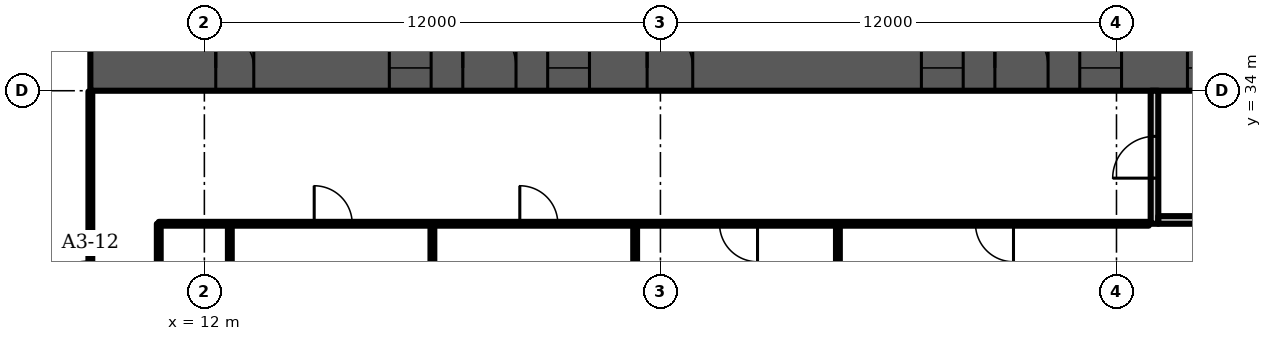
"""IFC4 building model, lengths in metres.
Left out: names, types, materials, properties, quantities, classifications, styles, units other than length and angle.
Written with IfcOpenShell. Run it as: python <this file> out.ifc"""

import sys

from ifc_helpers import new_model, si_unit, direction, frame, frame_2d, origin, place, context, subcontext, project, spatial, rectangle, extrude, element, fill, save


model = new_model("IFC4")
c1 = context("Model", 3, precision=1e-05, world=origin(), true_north=direction((0.0, 1.0)))
c2 = subcontext(c1, "Body", "Model", "MODEL_VIEW")
j1 = project(units=[si_unit("LENGTHUNIT", "METRE"), si_unit("PLANEANGLEUNIT", "RADIAN")], contexts=[c1])
p1 = place(None, origin())
s1 = spatial("IfcSite", under=j1, at=p1, CompositionType="ELEMENT")
p2 = place(p1, origin())
s2 = spatial("IfcBuilding", under=s1, at=p2, CompositionType="ELEMENT")
p3 = place(p2, frame((0.0, 0.0, 70.3)))
s3 = spatial("IfcBuildingStorey", under=s2, at=p3, CompositionType="ELEMENT", Elevation=70.3)
p4 = place(p3, frame((9.0, 34.6, 0.0), z_axis=(0.0, 0.0, 1.0), x_axis=(1.0, 0.0, 0.0)))
e1 = element("IfcWall", 1, at=p4, inside=s3, PredefinedType="SHEAR", context=c2, shape_type="SweptSolid", body=[
    extrude(rectangle(XDim=56.0, YDim=1.2, at=frame_2d((28.0, 0.0))), origin(), (0.0, 0.0, 1.0), 3.6),
])
p5 = place(p4, frame((3.3, 0.0, 0.0)))
e2 = element("IfcOpeningElement", 2, at=p5, cuts=e1, PredefinedType="OPENING", context=c2, shape_type="SweptSolid", body=[
    extrude(rectangle(XDim=1.0, YDim=2.1, at=frame_2d((0.5, 1.05))), frame((0.0, 0.61, 0.0), z_axis=(0.0, -1.0, 0.0), x_axis=(1.0, 0.0, 0.0)), (0.0, 0.0, 1.0), 1.22),
])
p6 = place(p4, frame((7.867, 0.0, 0.0)))
e3 = element("IfcOpeningElement", 3, at=p6, cuts=e1, PredefinedType="OPENING", context=c2, shape_type="SweptSolid", body=[
    extrude(rectangle(XDim=1.1, YDim=2.1, at=frame_2d((0.55, 1.05))), frame((0.0, 0.61, 0.0), z_axis=(0.0, -1.0, 0.0), x_axis=(1.0, 0.0, 0.0)), (0.0, 0.0, 1.0), 1.22),
])
p7 = place(p4, frame((12.033, 0.0, 0.0)))
e4 = element("IfcOpeningElement", 4, at=p7, cuts=e1, PredefinedType="OPENING", context=c2, shape_type="SweptSolid", body=[
    extrude(rectangle(XDim=1.1, YDim=2.1, at=frame_2d((0.55, 1.05))), frame((0.0, 0.61, 0.0), z_axis=(0.0, -1.0, 0.0), x_axis=(1.0, 0.0, 0.0)), (0.0, 0.0, 1.0), 1.22),
])
p8 = place(p4, frame((9.8, 0.0, 0.0)))
e5 = element("IfcOpeningElement", 5, at=p8, cuts=e1, PredefinedType="OPENING", context=c2, shape_type="SweptSolid", body=[
    extrude(rectangle(XDim=1.4, YDim=2.1, at=frame_2d((0.7, 1.05))), frame((0.0, 0.61, 0.0), z_axis=(0.0, -1.0, 0.0), x_axis=(1.0, 0.0, 0.0)), (0.0, 0.0, 1.0), 1.22),
])
p9 = place(p4, frame((14.65, 0.0, 0.0)))
e6 = element("IfcOpeningElement", 6, at=p9, cuts=e1, PredefinedType="OPENING", context=c2, shape_type="SweptSolid", body=[
    extrude(rectangle(XDim=1.2, YDim=2.1, at=frame_2d((0.6, 1.05))), frame((0.0, 0.61, 0.0), z_axis=(0.0, -1.0, 0.0), x_axis=(1.0, 0.0, 0.0)), (0.0, 0.0, 1.0), 1.22),
])
p10 = place(p4, frame((21.867, 0.0, 0.0)))
e7 = element("IfcOpeningElement", 7, at=p10, cuts=e1, PredefinedType="OPENING", context=c2, shape_type="SweptSolid", body=[
    extrude(rectangle(XDim=1.1, YDim=2.1, at=frame_2d((0.55, 1.05))), frame((0.0, 0.61, 0.0), z_axis=(0.0, -1.0, 0.0), x_axis=(1.0, 0.0, 0.0)), (0.0, 0.0, 1.0), 1.22),
])
p11 = place(p4, frame((26.033, 0.0, 0.0)))
e8 = element("IfcOpeningElement", 8, at=p11, cuts=e1, PredefinedType="OPENING", context=c2, shape_type="SweptSolid", body=[
    extrude(rectangle(XDim=1.1, YDim=2.1, at=frame_2d((0.55, 1.05))), frame((0.0, 0.61, 0.0), z_axis=(0.0, -1.0, 0.0), x_axis=(1.0, 0.0, 0.0)), (0.0, 0.0, 1.0), 1.22),
])
p12 = place(p4, frame((23.8, 0.0, 0.0)))
e9 = element("IfcOpeningElement", 9, at=p12, cuts=e1, PredefinedType="OPENING", context=c2, shape_type="SweptSolid", body=[
    extrude(rectangle(XDim=1.4, YDim=2.1, at=frame_2d((0.7, 1.05))), frame((0.0, 0.61, 0.0), z_axis=(0.0, -1.0, 0.0), x_axis=(1.0, 0.0, 0.0)), (0.0, 0.0, 1.0), 1.22),
])
p13 = place(p4, frame((28.867, 0.0, 0.0)))
e10 = element("IfcOpeningElement", 10, at=p13, cuts=e1, PredefinedType="OPENING", context=c2, shape_type="SweptSolid", body=[
    extrude(rectangle(XDim=1.1, YDim=2.1, at=frame_2d((0.55, 1.05))), frame((0.0, 0.61, 0.0), z_axis=(0.0, -1.0, 0.0), x_axis=(1.0, 0.0, 0.0)), (0.0, 0.0, 1.0), 1.22),
])
p14 = place(p4, frame((33.033, 0.0, 0.0)))
e11 = element("IfcOpeningElement", 11, at=p14, cuts=e1, PredefinedType="OPENING", context=c2, shape_type="SweptSolid", body=[
    extrude(rectangle(XDim=1.1, YDim=2.1, at=frame_2d((0.55, 1.05))), frame((0.0, 0.61, 0.0), z_axis=(0.0, -1.0, 0.0), x_axis=(1.0, 0.0, 0.0)), (0.0, 0.0, 1.0), 1.22),
])
p15 = place(p4, frame((40.15, 0.0, 0.0)))
e12 = element("IfcOpeningElement", 12, at=p15, cuts=e1, PredefinedType="OPENING", context=c2, shape_type="SweptSolid", body=[
    extrude(rectangle(XDim=1.2, YDim=2.1, at=frame_2d((0.6, 1.05))), frame((0.0, 0.61, 0.0), z_axis=(0.0, -1.0, 0.0), x_axis=(1.0, 0.0, 0.0)), (0.0, 0.0, 1.0), 1.22),
])
p16 = place(p4, frame((44.8, 0.0, 0.0)))
e13 = element("IfcOpeningElement", 13, at=p16, cuts=e1, PredefinedType="OPENING", context=c2, shape_type="SweptSolid", body=[
    extrude(rectangle(XDim=1.4, YDim=2.1, at=frame_2d((0.7, 1.05))), frame((0.0, 0.61, 0.0), z_axis=(0.0, -1.0, 0.0), x_axis=(1.0, 0.0, 0.0)), (0.0, 0.0, 1.0), 1.22),
])
p17 = place(p4, frame((49.867, 0.0, 0.0)))
e14 = element("IfcOpeningElement", 14, at=p17, cuts=e1, PredefinedType="OPENING", context=c2, shape_type="SweptSolid", body=[
    extrude(rectangle(XDim=1.1, YDim=2.1, at=frame_2d((0.55, 1.05))), frame((0.0, 0.61, 0.0), z_axis=(0.0, -1.0, 0.0), x_axis=(1.0, 0.0, 0.0)), (0.0, 0.0, 1.0), 1.22),
])
p18 = place(p4, frame((53.5, 0.0, 0.0)))
e15 = element("IfcOpeningElement", 15, at=p18, cuts=e1, PredefinedType="OPENING", context=c2, shape_type="SweptSolid", body=[
    extrude(rectangle(XDim=1.1, YDim=2.1, at=frame_2d((0.55, 1.05))), frame((0.0, 0.61, 0.0), z_axis=(0.0, -1.0, 0.0), x_axis=(1.0, 0.0, 0.0)), (0.0, 0.0, 1.0), 1.22),
])
p19 = place(p4, frame((51.567, 0.0, 0.0)))
e16 = element("IfcOpeningElement", 16, at=p19, cuts=e1, PredefinedType="OPENING", context=c2, shape_type="SweptSolid", body=[
    extrude(rectangle(XDim=1.4, YDim=2.1, at=frame_2d((0.7, 1.05))), frame((0.0, 0.61, 0.0), z_axis=(0.0, -1.0, 0.0), x_axis=(1.0, 0.0, 0.0)), (0.0, 0.0, 1.0), 1.22),
])
p20 = place(p3, frame((37.0, 30.5, 0.0), z_axis=(0.0, 0.0, 1.0), x_axis=(0.0, 1.0, 0.0)))
e17 = element("IfcWall", 17, at=p20, inside=s3, PredefinedType="PARTITIONING", context=c2, shape_type="SweptSolid", body=[
    extrude(rectangle(XDim=3.5, YDim=0.2, at=frame_2d((1.75, 0.0))), origin(), (0.0, 0.0, 1.0), 3.2),
])
p21 = place(p20, frame((1.2, 0.0, 0.0)))
e18 = element("IfcOpeningElement", 18, at=p21, cuts=e17, PredefinedType="OPENING", context=c2, shape_type="SweptSolid", body=[
    extrude(rectangle(XDim=1.1, YDim=2.1, at=frame_2d((0.55, 1.05))), frame((0.0, 0.11, 0.0), z_axis=(0.0, -1.0, 0.0), x_axis=(1.0, 0.0, 0.0)), (0.0, 0.0, 1.0), 0.22),
])
p22 = place(p3, frame((37.1, 30.6, 0.0), z_axis=(0.0, 0.0, 1.0), x_axis=(1.0, 0.0, 0.0)))
e19 = element("IfcWall", 19, at=p22, inside=s3, PredefinedType="PARTITIONING", context=c2, shape_type="SweptSolid", body=[
    extrude(rectangle(XDim=2.8, YDim=0.2, at=frame_2d((1.4, 0.0))), origin(), (0.0, 0.0, 1.0), 3.2),
])
p23 = place(p3, frame((9.0, 26.02, 0.0), z_axis=(0.0, 0.0, 1.0), x_axis=(0.0, 1.0, 0.0)))
e20 = element("IfcWall", 20, at=p23, inside=s3, PredefinedType="PARTITIONING", context=c2, shape_type="SweptSolid", body=[
    extrude(rectangle(XDim=7.96, YDim=0.1, at=frame_2d((3.98, 0.0))), origin(), (0.0, 0.0, 1.0), 3.2),
])
p24 = place(p23, frame((1.7, 0.0, 0.0)))
e21 = element("IfcOpeningElement", 21, at=p24, cuts=e20, PredefinedType="OPENING", context=c2, shape_type="SweptSolid", body=[
    extrude(rectangle(XDim=1.8, YDim=2.1, at=frame_2d((0.9, 1.05))), frame((0.0, 0.06, 0.0), z_axis=(0.0, -1.0, 0.0), x_axis=(1.0, 0.0, 0.0)), (0.0, 0.0, 1.0), 0.12),
])
p25 = place(p3, frame((10.8, 21.35, 0.0), z_axis=(0.0, 0.0, 1.0), x_axis=(0.0, 1.0, 0.0)))
e22 = element("IfcWall", 22, at=p25, inside=s3, PredefinedType="PARTITIONING", context=c2, shape_type="SweptSolid", body=[
    extrude(rectangle(XDim=9.15, YDim=0.1, at=frame_2d((4.575, 0.0))), origin(), (0.0, 0.0, 1.0), 3.2),
])
p26 = place(p25, frame((3.62, 0.0, 0.0)))
e23 = element("IfcOpeningElement", 23, at=p26, cuts=e22, PredefinedType="OPENING", context=c2, shape_type="SweptSolid", body=[
    extrude(rectangle(XDim=1.8, YDim=2.1, at=frame_2d((0.9, 1.05))), frame((0.0, 0.06, 0.0), z_axis=(0.0, -1.0, 0.0), x_axis=(1.0, 0.0, 0.0)), (0.0, 0.0, 1.0), 0.12),
])
p27 = place(p3, frame((10.8, 30.5, 0.0), z_axis=(0.0, 0.0, 1.0), x_axis=(1.0, 0.0, 0.0)))
e24 = element("IfcWall", 24, at=p27, inside=s3, PredefinedType="PARTITIONING", context=c2, shape_type="SweptSolid", body=[
    extrude(rectangle(XDim=26.05, YDim=0.1, at=frame_2d((13.025, 0.0))), origin(), (0.0, 0.0, 1.0), 3.2),
])
p28 = place(p27, frame((4.09, 0.0, 0.0)))
e25 = element("IfcOpeningElement", 25, at=p28, cuts=e24, PredefinedType="OPENING", context=c2, shape_type="SweptSolid", body=[
    extrude(rectangle(XDim=1.0, YDim=2.1, at=frame_2d((0.5, 1.05))), frame((0.0, 0.06, 0.0), z_axis=(0.0, -1.0, 0.0), x_axis=(1.0, 0.0, 0.0)), (0.0, 0.0, 1.0), 0.12),
])
p29 = place(p27, frame((9.5, 0.0, 0.0)))
e26 = element("IfcOpeningElement", 26, at=p29, cuts=e24, PredefinedType="OPENING", context=c2, shape_type="SweptSolid", body=[
    extrude(rectangle(XDim=1.0, YDim=2.1, at=frame_2d((0.5, 1.05))), frame((0.0, 0.06, 0.0), z_axis=(0.0, -1.0, 0.0), x_axis=(1.0, 0.0, 0.0)), (0.0, 0.0, 1.0), 0.12),
])
p30 = place(p27, frame((14.755, 0.0, 0.0)))
e27 = element("IfcOpeningElement", 27, at=p30, cuts=e24, PredefinedType="OPENING", context=c2, shape_type="SweptSolid", body=[
    extrude(rectangle(XDim=1.0, YDim=2.1, at=frame_2d((0.5, 1.05))), frame((0.0, 0.06, 0.0), z_axis=(0.0, -1.0, 0.0), x_axis=(1.0, 0.0, 0.0)), (0.0, 0.0, 1.0), 0.12),
])
p31 = place(p27, frame((21.49, 0.0, 0.0)))
e28 = element("IfcOpeningElement", 28, at=p31, cuts=e24, PredefinedType="OPENING", context=c2, shape_type="SweptSolid", body=[
    extrude(rectangle(XDim=1.0, YDim=2.1, at=frame_2d((0.5, 1.05))), frame((0.0, 0.06, 0.0), z_axis=(0.0, -1.0, 0.0), x_axis=(1.0, 0.0, 0.0)), (0.0, 0.0, 1.0), 0.12),
])
p32 = place(p3, frame((12.67, -1.088, 0.0), z_axis=(0.0, 0.0, 1.0), x_axis=(0.0, 1.0, 0.0)))
e29 = element("IfcWall", 29, at=p32, inside=s3, PredefinedType="PARTITIONING", context=c2, shape_type="SweptSolid", body=[
    extrude(rectangle(XDim=31.588, YDim=0.1, at=frame_2d((15.794, 0.0))), origin(), (0.0, 0.0, 1.0), 3.2),
])
p33 = place(p3, frame((18.0, -0.94, 0.0), z_axis=(0.0, 0.0, 1.0), x_axis=(0.0, 1.0, 0.0)))
e30 = element("IfcWall", 30, at=p33, inside=s3, PredefinedType="PARTITIONING", context=c2, shape_type="SweptSolid", body=[
    extrude(rectangle(XDim=31.44, YDim=0.1, at=frame_2d((15.72, 0.0))), origin(), (0.0, 0.0, 1.0), 3.2),
])
p34 = place(p3, frame((23.335, -1.41, 0.0), z_axis=(0.0, 0.0, 1.0), x_axis=(0.0, 1.0, 0.0)))
e31 = element("IfcWall", 31, at=p34, inside=s3, PredefinedType="PARTITIONING", context=c2, shape_type="SweptSolid", body=[
    extrude(rectangle(XDim=31.91, YDim=0.1, at=frame_2d((15.955, 0.0))), origin(), (0.0, 0.0, 1.0), 3.2),
])
p35 = place(p3, frame((28.67, -1.875, 0.0), z_axis=(0.0, 0.0, 1.0), x_axis=(0.0, 1.0, 0.0)))
e32 = element("IfcWall", 32, at=p35, inside=s3, PredefinedType="PARTITIONING", context=c2, shape_type="SweptSolid", body=[
    extrude(rectangle(XDim=32.375, YDim=0.1, at=frame_2d((16.188, 0.0))), origin(), (0.0, 0.0, 1.0), 3.2),
])
p36 = place(p5, origin())
e33 = element("IfcDoor", 33, at=p36, inside=s3, OperationType="SINGLE_SWING_LEFT", PredefinedType="DOOR", context=c2, shape_type="SweptSolid", body=[
    extrude(rectangle(XDim=1.0, YDim=2.1, at=frame_2d((0.5, 1.05))), frame((0.0, 0.6, 0.0), z_axis=(0.0, -1.0, 0.0), x_axis=(1.0, 0.0, 0.0)), (0.0, 0.0, 1.0), 1.199),
])
fill(e2, e33)
p37 = place(p6, origin())
e34 = element("IfcDoor", 34, at=p37, inside=s3, OperationType="DOUBLE_DOOR_SLIDING", PredefinedType="DOOR", context=c2, shape_type="SweptSolid", body=[
    extrude(rectangle(XDim=1.1, YDim=2.1, at=frame_2d((0.55, 1.05))), frame((0.0, 0.025, 0.0), z_axis=(0.0, -1.0, 0.0), x_axis=(1.0, 0.0, 0.0)), (0.0, 0.0, 1.0), 0.05),
])
fill(e3, e34)
p38 = place(p7, origin())
e35 = element("IfcDoor", 35, at=p38, inside=s3, OperationType="DOUBLE_DOOR_SLIDING", PredefinedType="DOOR", context=c2, shape_type="SweptSolid", body=[
    extrude(rectangle(XDim=1.1, YDim=2.1, at=frame_2d((0.55, 1.05))), frame((0.0, 0.025, 0.0), z_axis=(0.0, -1.0, 0.0), x_axis=(1.0, 0.0, 0.0)), (0.0, 0.0, 1.0), 0.05),
])
fill(e4, e35)
p39 = place(p8, origin())
e36 = element("IfcDoor", 36, at=p39, inside=s3, OperationType="DOUBLE_DOOR_SINGLE_SWING", PredefinedType="DOOR", context=c2, shape_type="SweptSolid", body=[
    extrude(rectangle(XDim=1.4, YDim=2.1, at=frame_2d((0.7, 1.05))), frame((0.0, 0.025, 0.0), z_axis=(0.0, -1.0, 0.0), x_axis=(1.0, 0.0, 0.0)), (0.0, 0.0, 1.0), 0.05),
])
fill(e5, e36)
p40 = place(p9, origin())
e37 = element("IfcDoor", 37, at=p40, inside=s3, OperationType="SINGLE_SWING_LEFT", PredefinedType="DOOR", context=c2, shape_type="SweptSolid", body=[
    extrude(rectangle(XDim=1.2, YDim=2.1, at=frame_2d((0.6, 1.05))), frame((0.0, 0.025, 0.0), z_axis=(0.0, -1.0, 0.0), x_axis=(1.0, 0.0, 0.0)), (0.0, 0.0, 1.0), 0.05),
])
fill(e6, e37)
p41 = place(p10, origin())
e38 = element("IfcDoor", 38, at=p41, inside=s3, OperationType="DOUBLE_DOOR_SLIDING", PredefinedType="DOOR", context=c2, shape_type="SweptSolid", body=[
    extrude(rectangle(XDim=1.1, YDim=2.1, at=frame_2d((0.55, 1.05))), frame((0.0, 0.025, 0.0), z_axis=(0.0, -1.0, 0.0), x_axis=(1.0, 0.0, 0.0)), (0.0, 0.0, 1.0), 0.05),
])
fill(e7, e38)
p42 = place(p11, origin())
e39 = element("IfcDoor", 39, at=p42, inside=s3, OperationType="DOUBLE_DOOR_SLIDING", PredefinedType="DOOR", context=c2, shape_type="SweptSolid", body=[
    extrude(rectangle(XDim=1.1, YDim=2.1, at=frame_2d((0.55, 1.05))), frame((0.0, 0.025, 0.0), z_axis=(0.0, -1.0, 0.0), x_axis=(1.0, 0.0, 0.0)), (0.0, 0.0, 1.0), 0.05),
])
fill(e8, e39)
p43 = place(p12, origin())
e40 = element("IfcDoor", 40, at=p43, inside=s3, OperationType="DOUBLE_DOOR_SINGLE_SWING", PredefinedType="DOOR", context=c2, shape_type="SweptSolid", body=[
    extrude(rectangle(XDim=1.4, YDim=2.1, at=frame_2d((0.7, 1.05))), frame((0.0, 0.025, 0.0), z_axis=(0.0, -1.0, 0.0), x_axis=(1.0, 0.0, 0.0)), (0.0, 0.0, 1.0), 0.05),
])
fill(e9, e40)
p44 = place(p13, origin())
e41 = element("IfcDoor", 41, at=p44, inside=s3, OperationType="DOUBLE_DOOR_SLIDING", PredefinedType="DOOR", context=c2, shape_type="SweptSolid", body=[
    extrude(rectangle(XDim=1.1, YDim=2.1, at=frame_2d((0.55, 1.05))), frame((0.0, 0.025, 0.0), z_axis=(0.0, -1.0, 0.0), x_axis=(1.0, 0.0, 0.0)), (0.0, 0.0, 1.0), 0.05),
])
fill(e10, e41)
p45 = place(p21, origin())
e42 = element("IfcDoor", 42, at=p45, inside=s3, OperationType="SINGLE_SWING_LEFT", PredefinedType="DOOR", context=c2, shape_type="SweptSolid", body=[
    extrude(rectangle(XDim=1.1, YDim=2.1, at=frame_2d((0.55, 1.05))), frame((0.0, 0.025, 0.0), z_axis=(0.0, -1.0, 0.0), x_axis=(1.0, 0.0, 0.0)), (0.0, 0.0, 1.0), 0.05),
])
fill(e18, e42)
p46 = place(p24, origin())
e43 = element("IfcDoor", 43, at=p46, inside=s3, OperationType="DOUBLE_DOOR_SINGLE_SWING", PredefinedType="DOOR", context=c2, shape_type="SweptSolid", body=[
    extrude(rectangle(XDim=1.8, YDim=2.1, at=frame_2d((0.9, 1.05))), frame((0.0, 0.025, 0.0), z_axis=(0.0, -1.0, 0.0), x_axis=(1.0, 0.0, 0.0)), (0.0, 0.0, 1.0), 0.05),
])
fill(e21, e43)
p47 = place(p28, origin())
e44 = element("IfcDoor", 44, at=p47, inside=s3, OperationType="SINGLE_SWING_LEFT", PredefinedType="DOOR", context=c2, shape_type="SweptSolid", body=[
    extrude(rectangle(XDim=1.0, YDim=2.1, at=frame_2d((0.5, 1.05))), frame((0.0, 0.025, 0.0), z_axis=(0.0, -1.0, 0.0), x_axis=(1.0, 0.0, 0.0)), (0.0, 0.0, 1.0), 0.05),
])
fill(e25, e44)
p48 = place(p29, origin())
e45 = element("IfcDoor", 45, at=p48, inside=s3, OperationType="SINGLE_SWING_LEFT", PredefinedType="DOOR", context=c2, shape_type="SweptSolid", body=[
    extrude(rectangle(XDim=1.0, YDim=2.1, at=frame_2d((0.5, 1.05))), frame((0.0, 0.025, 0.0), z_axis=(0.0, -1.0, 0.0), x_axis=(1.0, 0.0, 0.0)), (0.0, 0.0, 1.0), 0.05),
])
fill(e26, e45)
p49 = place(p30, origin())
e46 = element("IfcDoor", 46, at=p49, inside=s3, OperationType="SINGLE_SWING_RIGHT", PredefinedType="DOOR", context=c2, shape_type="SweptSolid", body=[
    extrude(rectangle(XDim=1.0, YDim=2.1, at=frame_2d((0.5, 1.05))), frame((0.0, 0.025, 0.0), z_axis=(0.0, -1.0, 0.0), x_axis=(1.0, 0.0, 0.0)), (0.0, 0.0, 1.0), 0.05),
])
fill(e27, e46)
p50 = place(p31, origin())
e47 = element("IfcDoor", 47, at=p50, inside=s3, OperationType="SINGLE_SWING_RIGHT", PredefinedType="DOOR", context=c2, shape_type="SweptSolid", body=[
    extrude(rectangle(XDim=1.0, YDim=2.1, at=frame_2d((0.5, 1.05))), frame((0.0, 0.025, 0.0), z_axis=(0.0, -1.0, 0.0), x_axis=(1.0, 0.0, 0.0)), (0.0, 0.0, 1.0), 0.05),
])
fill(e28, e47)
save(model, sys.argv[1])
